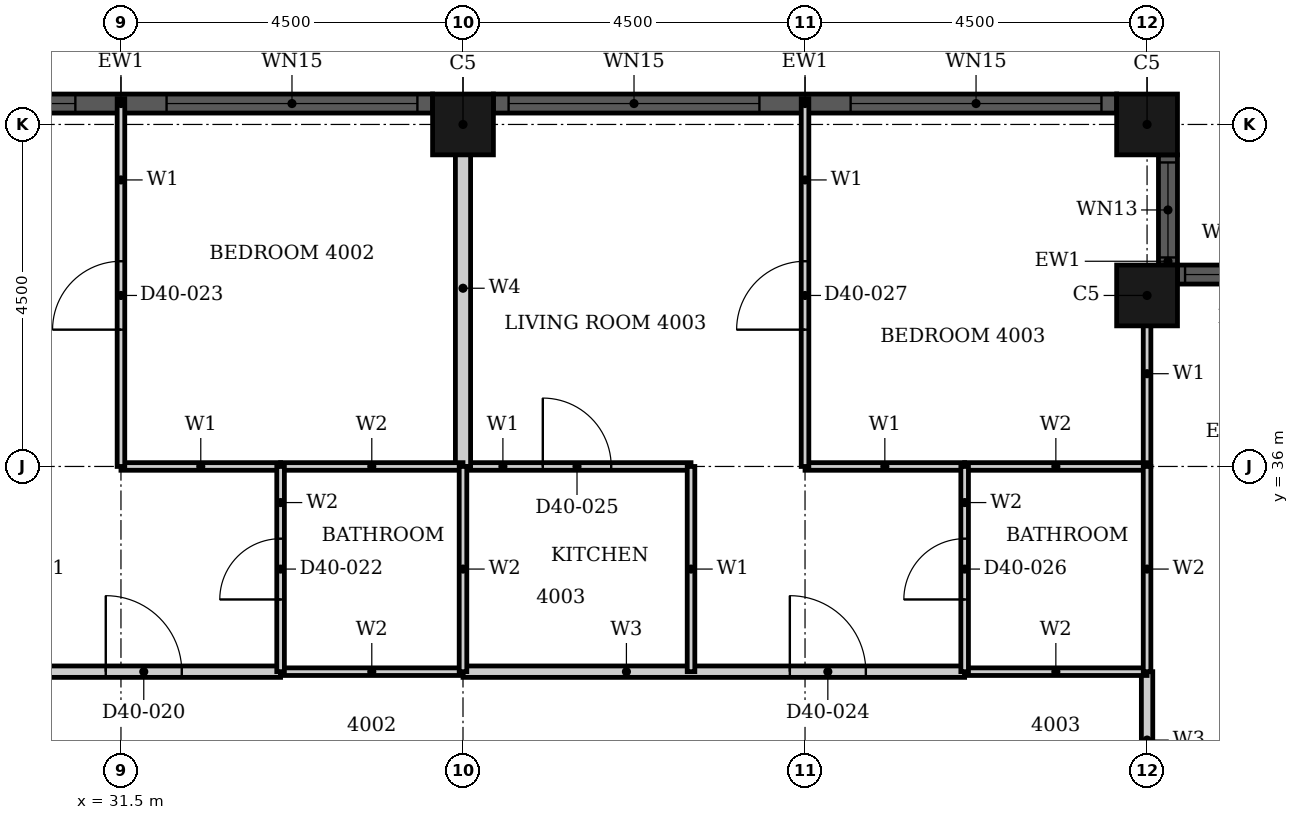
"""IFC4 building model, lengths in metres.
Left out: names, types, materials, properties, quantities, classifications, styles, units other than length and angle.
Written with IfcOpenShell. Run it as: python <this file> out.ifc"""

import sys

from ifc_helpers import new_model, si_unit, direction, frame, frame_2d, origin, origin_2d, place, context, subcontext, project, spatial, rectangle, hollow_rectangle, extrude, element, fill, save


model = new_model("IFC4")
c1 = context("Model", 3, precision=1e-05, world=origin(), true_north=direction((0.0, 1.0)))
c2 = subcontext(c1, "Body", "Model", "MODEL_VIEW")
j1 = project(units=[si_unit("LENGTHUNIT", "METRE"), si_unit("PLANEANGLEUNIT", "RADIAN")], contexts=[c1])
p1 = place(None, origin())
s1 = spatial("IfcSite", under=j1, at=p1, CompositionType="ELEMENT")
p2 = place(p1, origin())
s2 = spatial("IfcBuilding", under=s1, at=p2, CompositionType="ELEMENT")
p3 = place(p2, frame((0.0, 0.0, 161.7)))
s3 = spatial("IfcBuildingStorey", under=s2, at=p3, CompositionType="ELEMENT", Elevation=161.7)
for number, where, z_axis, x_axis in (
    (1, (45.0, 38.25, 0.0), (0.0, 0.0, 1.0), (1.0, 0.0, 0.0)),
    (2, (45.0, 40.5, 0.0), (0.0, 0.0, 1.0), (1.0, 0.0, 0.0)),
    (3, (36.0, 40.5, 0.0), (0.0, 0.0, 1.0), (1.0, 0.0, 0.0)),
):
    element("IfcColumn", number, at=place(p3, frame(where, z_axis=z_axis, x_axis=x_axis)), inside=s3, PredefinedType="COLUMN", context=c2, shape_type="SweptSolid", body=[
        extrude(hollow_rectangle(XDim=0.8, YDim=0.8, WallThickness=0.025, at=origin_2d()), origin(), (0.0, 0.0, 1.0), 3.7),
    ])
p4 = place(p3, frame((46.85, 38.525, 0.0), z_axis=(0.0, 0.0, 1.0), x_axis=(-1.0, 0.0, 0.0)))
e4 = element("IfcWall", 4, at=p4, inside=s3, PredefinedType="SOLIDWALL", context=c2, shape_type="SweptSolid", body=[
    extrude(rectangle(XDim=1.45, YDim=0.25, at=frame_2d((0.725, 0.0))), origin(), (0.0, 0.0, 1.0), 3.7),
])
p5 = place(p4, frame((0.1, 0.0, 0.9)))
e5 = element("IfcOpeningElement", 5, at=p5, cuts=e4, PredefinedType="OPENING", context=c2, shape_type="SweptSolid", body=[
    extrude(rectangle(XDim=1.25, YDim=1.85, at=frame_2d((0.625, 0.925))), frame((0.0, 0.135, 0.0), z_axis=(0.0, -1.0, 0.0), x_axis=(1.0, 0.0, 0.0)), (0.0, 0.0, 1.0), 0.27),
])
p6 = place(p3, frame((45.275, 38.65, 0.0), z_axis=(0.0, 0.0, 1.0), x_axis=(0.0, 1.0, 0.0)))
e6 = element("IfcWall", 6, at=p6, inside=s3, PredefinedType="SOLIDWALL", context=c2, shape_type="SweptSolid", body=[
    extrude(rectangle(XDim=1.45, YDim=0.25, at=frame_2d((0.725, 0.0))), origin(), (0.0, 0.0, 1.0), 3.7),
])
p7 = place(p6, frame((0.1, 0.0, 0.9)))
e7 = element("IfcOpeningElement", 7, at=p7, cuts=e6, PredefinedType="OPENING", context=c2, shape_type="SweptSolid", body=[
    extrude(rectangle(XDim=1.25, YDim=1.85, at=frame_2d((0.625, 0.925))), frame((0.0, 0.135, 0.0), z_axis=(0.0, -1.0, 0.0), x_axis=(1.0, 0.0, 0.0)), (0.0, 0.0, 1.0), 0.27),
])
p8 = place(p3, frame((44.6, 40.775, 0.0), z_axis=(0.0, 0.0, 1.0), x_axis=(-1.0, 0.0, 0.0)))
e8 = element("IfcWall", 8, at=p8, inside=s3, PredefinedType="SOLIDWALL", context=c2, shape_type="SweptSolid", body=[
    extrude(rectangle(XDim=8.2, YDim=0.25, at=frame_2d((4.1, 0.0))), origin(), (0.0, 0.0, 1.0), 3.7),
])
p9 = place(p8, frame((0.2, 0.0, 0.45)))
e9 = element("IfcOpeningElement", 9, at=p9, cuts=e8, PredefinedType="OPENING", context=c2, shape_type="SweptSolid", body=[
    extrude(rectangle(XDim=3.3, YDim=2.3, at=frame_2d((1.65, 1.15))), frame((0.0, 0.135, 0.0), z_axis=(0.0, -1.0, 0.0), x_axis=(1.0, 0.0, 0.0)), (0.0, 0.0, 1.0), 0.27),
])
p10 = place(p8, frame((4.7, 0.0, 0.45)))
e10 = element("IfcOpeningElement", 10, at=p10, cuts=e8, PredefinedType="OPENING", context=c2, shape_type="SweptSolid", body=[
    extrude(rectangle(XDim=3.3, YDim=2.3, at=frame_2d((1.65, 1.15))), frame((0.0, 0.135, 0.0), z_axis=(0.0, -1.0, 0.0), x_axis=(1.0, 0.0, 0.0)), (0.0, 0.0, 1.0), 0.27),
])
p11 = place(p3, frame((35.6, 40.775, 0.0), z_axis=(0.0, 0.0, 1.0), x_axis=(-1.0, 0.0, 0.0)))
e11 = element("IfcWall", 11, at=p11, inside=s3, PredefinedType="SOLIDWALL", context=c2, shape_type="SweptSolid", body=[
    extrude(rectangle(XDim=8.2, YDim=0.25, at=frame_2d((4.1, 0.0))), origin(), (0.0, 0.0, 1.0), 3.7),
])
p12 = place(p11, frame((0.2, 0.0, 0.45)))
e12 = element("IfcOpeningElement", 12, at=p12, cuts=e11, PredefinedType="OPENING", context=c2, shape_type="SweptSolid", body=[
    extrude(rectangle(XDim=3.3, YDim=2.3, at=frame_2d((1.65, 1.15))), frame((0.0, 0.135, 0.0), z_axis=(0.0, -1.0, 0.0), x_axis=(1.0, 0.0, 0.0)), (0.0, 0.0, 1.0), 0.27),
])
p13 = place(p11, frame((4.7, 0.0, 0.45)))
e13 = element("IfcOpeningElement", 13, at=p13, cuts=e11, PredefinedType="OPENING", context=c2, shape_type="SweptSolid", body=[
    extrude(rectangle(XDim=3.3, YDim=2.3, at=frame_2d((1.65, 1.15))), frame((0.0, 0.135, 0.0), z_axis=(0.0, -1.0, 0.0), x_axis=(1.0, 0.0, 0.0)), (0.0, 0.0, 1.0), 0.27),
])
p14 = place(p3, frame((27.0, 33.3, 0.0), z_axis=(0.0, 0.0, 1.0), x_axis=(1.0, 0.0, 0.0)))
e14 = element("IfcWall", 14, at=p14, inside=s3, PredefinedType="PARTITIONING", context=c2, shape_type="SweptSolid", body=[
    extrude(rectangle(XDim=6.6, YDim=0.15, at=frame_2d((3.3, 0.0))), origin(), (0.0, 0.0, 1.0), 3.4),
])
p15 = place(p14, frame((4.3, 0.0, 0.0)))
e15 = element("IfcOpeningElement", 15, at=p15, cuts=e14, PredefinedType="OPENING", context=c2, shape_type="SweptSolid", body=[
    extrude(rectangle(XDim=1.0, YDim=2.2, at=frame_2d((0.5, 1.1))), frame((0.0, 0.085, 0.0), z_axis=(0.0, -1.0, 0.0), x_axis=(1.0, 0.0, 0.0)), (0.0, 0.0, 1.0), 0.17),
])
p16 = place(p3, frame((36.0, 33.3, 0.0), z_axis=(0.0, 0.0, 1.0), x_axis=(1.0, 0.0, 0.0)))
e16 = element("IfcWall", 16, at=p16, inside=s3, PredefinedType="PARTITIONING", context=c2, shape_type="SweptSolid", body=[
    extrude(rectangle(XDim=6.6, YDim=0.15, at=frame_2d((3.3, 0.0))), origin(), (0.0, 0.0, 1.0), 3.4),
])
p17 = place(p16, frame((4.3, 0.0, 0.0)))
e17 = element("IfcOpeningElement", 17, at=p17, cuts=e16, PredefinedType="OPENING", context=c2, shape_type="SweptSolid", body=[
    extrude(rectangle(XDim=1.0, YDim=2.2, at=frame_2d((0.5, 1.1))), frame((0.0, 0.085, 0.0), z_axis=(0.0, -1.0, 0.0), x_axis=(1.0, 0.0, 0.0)), (0.0, 0.0, 1.0), 0.17),
])
p18 = place(p3, frame((45.0, 31.5, 0.0), z_axis=(0.0, 0.0, 1.0), x_axis=(0.0, 1.0, 0.0)))
e18 = element("IfcWall", 18, at=p18, inside=s3, PredefinedType="PARTITIONING", context=c2, shape_type="SweptSolid", body=[
    extrude(rectangle(XDim=1.8, YDim=0.15, at=frame_2d((0.9, 0.0))), origin(), (0.0, 0.0, 1.0), 3.4),
])
for number, where, z_axis, x_axis in (
    (19, (31.5, 36.0, 0.0), (0.0, 0.0, 1.0), (1.0, 0.0, 0.0)),
    (20, (40.5, 36.0, 0.0), (0.0, 0.0, 1.0), (1.0, 0.0, 0.0)),
):
    element("IfcWall", number, at=place(p3, frame(where, z_axis=z_axis, x_axis=x_axis)), inside=s3, PredefinedType="PARTITIONING", context=c2, shape_type="SweptSolid", body=[
        extrude(rectangle(XDim=2.1, YDim=0.1, at=frame_2d((1.05, 0.0))), origin(), (0.0, 0.0, 1.0), 3.4),
    ])
p19 = place(p3, frame((36.0, 36.0, 0.0), z_axis=(0.0, 0.0, 1.0), x_axis=(1.0, 0.0, 0.0)))
e21 = element("IfcWall", 21, at=p19, inside=s3, PredefinedType="PARTITIONING", context=c2, shape_type="SweptSolid", body=[
    extrude(rectangle(XDim=3.0, YDim=0.1, at=frame_2d((1.5, 0.0))), origin(), (0.0, 0.0, 1.0), 3.4),
])
p20 = place(p19, frame((1.05, 0.0, 0.0)))
e22 = element("IfcOpeningElement", 22, at=p20, cuts=e21, PredefinedType="OPENING", context=c2, shape_type="SweptSolid", body=[
    extrude(rectangle(XDim=0.9, YDim=2.1, at=frame_2d((0.45, 1.05))), frame((0.0, 0.06, 0.0), z_axis=(0.0, -1.0, 0.0), x_axis=(1.0, 0.0, 0.0)), (0.0, 0.0, 1.0), 0.12),
])
p21 = place(p3, frame((31.5, 36.0, 0.0), z_axis=(0.0, 0.0, 1.0), x_axis=(0.0, 1.0, 0.0)))
e23 = element("IfcWall", 23, at=p21, inside=s3, PredefinedType="PARTITIONING", context=c2, shape_type="SweptSolid", body=[
    extrude(rectangle(XDim=4.84, YDim=0.1, at=frame_2d((2.42, 0.0))), origin(), (0.0, 0.0, 1.0), 3.4),
])
p22 = place(p21, frame((1.8, 0.0, 0.0)))
e24 = element("IfcOpeningElement", 24, at=p22, cuts=e23, PredefinedType="OPENING", context=c2, shape_type="SweptSolid", body=[
    extrude(rectangle(XDim=0.9, YDim=2.1, at=frame_2d((0.45, 1.05))), frame((0.0, 0.06, 0.0), z_axis=(0.0, -1.0, 0.0), x_axis=(1.0, 0.0, 0.0)), (0.0, 0.0, 1.0), 0.12),
])
p23 = place(p3, frame((39.0, 33.3, 0.0), z_axis=(0.0, 0.0, 1.0), x_axis=(0.0, 1.0, 0.0)))
e25 = element("IfcWall", 25, at=p23, inside=s3, PredefinedType="PARTITIONING", context=c2, shape_type="SweptSolid", body=[
    extrude(rectangle(XDim=2.7, YDim=0.1, at=frame_2d((1.35, 0.0))), origin(), (0.0, 0.0, 1.0), 3.4),
])
p24 = place(p3, frame((40.5, 36.0, 0.0), z_axis=(0.0, 0.0, 1.0), x_axis=(0.0, 1.0, 0.0)))
e26 = element("IfcWall", 26, at=p24, inside=s3, PredefinedType="PARTITIONING", context=c2, shape_type="SweptSolid", body=[
    extrude(rectangle(XDim=4.84, YDim=0.1, at=frame_2d((2.42, 0.0))), origin(), (0.0, 0.0, 1.0), 3.4),
])
p25 = place(p24, frame((1.8, 0.0, 0.0)))
e27 = element("IfcOpeningElement", 27, at=p25, cuts=e26, PredefinedType="OPENING", context=c2, shape_type="SweptSolid", body=[
    extrude(rectangle(XDim=0.9, YDim=2.1, at=frame_2d((0.45, 1.05))), frame((0.0, 0.06, 0.0), z_axis=(0.0, -1.0, 0.0), x_axis=(1.0, 0.0, 0.0)), (0.0, 0.0, 1.0), 0.12),
])
p26 = place(p3, frame((45.0, 36.001, 0.0), z_axis=(0.0, 0.0, 1.0), x_axis=(0.0, 1.0, 0.0)))
e28 = element("IfcWall", 28, at=p26, inside=s3, PredefinedType="PARTITIONING", context=c2, shape_type="SweptSolid", body=[
    extrude(rectangle(XDim=2.439, YDim=0.1, at=frame_2d((1.219, 0.0))), origin(), (0.0, 0.0, 1.0), 3.4),
])
p27 = place(p3, frame((36.0, 36.0, 0.0), z_axis=(0.0, 0.0, 1.0), x_axis=(0.0, 1.0, 0.0)))
e29 = element("IfcWall", 29, at=p27, inside=s3, PredefinedType="PARTITIONING", context=c2, shape_type="SweptSolid", body=[
    extrude(rectangle(XDim=4.69, YDim=0.2, at=frame_2d((2.345, 0.0))), origin(), (0.0, 0.0, 1.0), 3.4),
])
for number, where, z_axis, x_axis in (
    (30, (33.6, 33.3, 0.0), (0.0, 0.0, 1.0), (1.0, 0.0, 0.0)),
    (31, (42.6, 33.3, 0.0), (0.0, 0.0, 1.0), (1.0, 0.0, 0.0)),
    (32, (33.6, 36.0, 0.0), (0.0, 0.0, 1.0), (1.0, 0.0, 0.0)),
    (33, (42.6, 36.0, 0.0), (0.0, 0.0, 1.0), (1.0, 0.0, 0.0)),
):
    element("IfcWall", number, at=place(p3, frame(where, z_axis=z_axis, x_axis=x_axis)), inside=s3, PredefinedType="PARTITIONING", context=c2, shape_type="SweptSolid", body=[
        extrude(rectangle(XDim=2.4, YDim=0.1, at=frame_2d((1.2, 0.0))), origin(), (0.0, 0.0, 1.0), 3.4),
    ])
p28 = place(p3, frame((33.6, 33.3, 0.0), z_axis=(0.0, 0.0, 1.0), x_axis=(0.0, 1.0, 0.0)))
e34 = element("IfcWall", 34, at=p28, inside=s3, PredefinedType="PARTITIONING", context=c2, shape_type="SweptSolid", body=[
    extrude(rectangle(XDim=2.7, YDim=0.1, at=frame_2d((1.35, 0.0))), origin(), (0.0, 0.0, 1.0), 3.4),
])
p29 = place(p28, frame((0.95, 0.0, 0.0)))
e35 = element("IfcOpeningElement", 35, at=p29, cuts=e34, PredefinedType="OPENING", context=c2, shape_type="SweptSolid", body=[
    extrude(rectangle(XDim=0.8, YDim=2.1, at=frame_2d((0.4, 1.05))), frame((0.0, 0.06, 0.0), z_axis=(0.0, -1.0, 0.0), x_axis=(1.0, 0.0, 0.0)), (0.0, 0.0, 1.0), 0.12),
])
p30 = place(p3, frame((36.0, 33.3, 0.0), z_axis=(0.0, 0.0, 1.0), x_axis=(0.0, 1.0, 0.0)))
e36 = element("IfcWall", 36, at=p30, inside=s3, PredefinedType="PARTITIONING", context=c2, shape_type="SweptSolid", body=[
    extrude(rectangle(XDim=2.7, YDim=0.1, at=frame_2d((1.35, 0.0))), origin(), (0.0, 0.0, 1.0), 3.4),
])
p31 = place(p3, frame((42.6, 33.3, 0.0), z_axis=(0.0, 0.0, 1.0), x_axis=(0.0, 1.0, 0.0)))
e37 = element("IfcWall", 37, at=p31, inside=s3, PredefinedType="PARTITIONING", context=c2, shape_type="SweptSolid", body=[
    extrude(rectangle(XDim=2.7, YDim=0.1, at=frame_2d((1.35, 0.0))), origin(), (0.0, 0.0, 1.0), 3.4),
])
p32 = place(p31, frame((0.95, 0.0, 0.0)))
e38 = element("IfcOpeningElement", 38, at=p32, cuts=e37, PredefinedType="OPENING", context=c2, shape_type="SweptSolid", body=[
    extrude(rectangle(XDim=0.8, YDim=2.1, at=frame_2d((0.4, 1.05))), frame((0.0, 0.06, 0.0), z_axis=(0.0, -1.0, 0.0), x_axis=(1.0, 0.0, 0.0)), (0.0, 0.0, 1.0), 0.12),
])
p33 = place(p3, frame((45.0, 33.3, 0.0), z_axis=(0.0, 0.0, 1.0), x_axis=(0.0, 1.0, 0.0)))
e39 = element("IfcWall", 39, at=p33, inside=s3, PredefinedType="PARTITIONING", context=c2, shape_type="SweptSolid", body=[
    extrude(rectangle(XDim=2.7, YDim=0.1, at=frame_2d((1.35, 0.0))), origin(), (0.0, 0.0, 1.0), 3.4),
])
p34 = place(p5, origin())
e40 = element("IfcWindow", 40, at=p34, inside=s3, PartitioningType="SINGLE_PANEL", PredefinedType="WINDOW", context=c2, shape_type="SweptSolid", body=[
    extrude(rectangle(XDim=1.25, YDim=1.85, at=frame_2d((0.625, 0.925))), frame((0.0, 0.03, 0.0), z_axis=(0.0, -1.0, 0.0), x_axis=(1.0, 0.0, 0.0)), (0.0, 0.0, 1.0), 0.06),
])
fill(e5, e40)
p35 = place(p7, origin())
e41 = element("IfcWindow", 41, at=p35, inside=s3, PartitioningType="SINGLE_PANEL", PredefinedType="WINDOW", context=c2, shape_type="SweptSolid", body=[
    extrude(rectangle(XDim=1.25, YDim=1.85, at=frame_2d((0.625, 0.925))), frame((0.0, 0.03, 0.0), z_axis=(0.0, -1.0, 0.0), x_axis=(1.0, 0.0, 0.0)), (0.0, 0.0, 1.0), 0.06),
])
fill(e7, e41)
p36 = place(p9, origin())
e42 = element("IfcWindow", 42, at=p36, inside=s3, PartitioningType="SINGLE_PANEL", PredefinedType="WINDOW", context=c2, shape_type="SweptSolid", body=[
    extrude(rectangle(XDim=3.3, YDim=2.3, at=frame_2d((1.65, 1.15))), frame((0.0, 0.03, 0.0), z_axis=(0.0, -1.0, 0.0), x_axis=(1.0, 0.0, 0.0)), (0.0, 0.0, 1.0), 0.06),
])
fill(e9, e42)
p37 = place(p10, origin())
e43 = element("IfcWindow", 43, at=p37, inside=s3, PartitioningType="SINGLE_PANEL", PredefinedType="WINDOW", context=c2, shape_type="SweptSolid", body=[
    extrude(rectangle(XDim=3.3, YDim=2.3, at=frame_2d((1.65, 1.15))), frame((0.0, 0.03, 0.0), z_axis=(0.0, -1.0, 0.0), x_axis=(1.0, 0.0, 0.0)), (0.0, 0.0, 1.0), 0.06),
])
fill(e10, e43)
p38 = place(p12, origin())
e44 = element("IfcWindow", 44, at=p38, inside=s3, PartitioningType="SINGLE_PANEL", PredefinedType="WINDOW", context=c2, shape_type="SweptSolid", body=[
    extrude(rectangle(XDim=3.3, YDim=2.3, at=frame_2d((1.65, 1.15))), frame((0.0, 0.03, 0.0), z_axis=(0.0, -1.0, 0.0), x_axis=(1.0, 0.0, 0.0)), (0.0, 0.0, 1.0), 0.06),
])
fill(e12, e44)
p39 = place(p13, origin())
e45 = element("IfcWindow", 45, at=p39, inside=s3, PartitioningType="SINGLE_PANEL", PredefinedType="WINDOW", context=c2, shape_type="SweptSolid", body=[
    extrude(rectangle(XDim=3.3, YDim=2.3, at=frame_2d((1.65, 1.15))), frame((0.0, 0.03, 0.0), z_axis=(0.0, -1.0, 0.0), x_axis=(1.0, 0.0, 0.0)), (0.0, 0.0, 1.0), 0.06),
])
fill(e13, e45)
p40 = place(p15, origin())
e46 = element("IfcDoor", 46, at=p40, inside=s3, OperationType="SINGLE_SWING_LEFT", PredefinedType="DOOR", context=c2, shape_type="SweptSolid", body=[
    extrude(rectangle(XDim=1.0, YDim=2.2, at=frame_2d((0.5, 1.1))), frame((0.0, 0.025, 0.0), z_axis=(0.0, -1.0, 0.0), x_axis=(1.0, 0.0, 0.0)), (0.0, 0.0, 1.0), 0.05),
])
fill(e15, e46)
p41 = place(p29, origin())
e47 = element("IfcDoor", 47, at=p41, inside=s3, OperationType="SINGLE_SWING_LEFT", PredefinedType="DOOR", context=c2, shape_type="SweptSolid", body=[
    extrude(rectangle(XDim=0.8, YDim=2.1, at=frame_2d((0.4, 1.05))), frame((0.0, 0.025, 0.0), z_axis=(0.0, -1.0, 0.0), x_axis=(1.0, 0.0, 0.0)), (0.0, 0.0, 1.0), 0.05),
])
fill(e35, e47)
p42 = place(p22, origin())
e48 = element("IfcDoor", 48, at=p42, inside=s3, OperationType="SINGLE_SWING_LEFT", PredefinedType="DOOR", context=c2, shape_type="SweptSolid", body=[
    extrude(rectangle(XDim=0.9, YDim=2.1, at=frame_2d((0.45, 1.05))), frame((0.0, 0.025, 0.0), z_axis=(0.0, -1.0, 0.0), x_axis=(1.0, 0.0, 0.0)), (0.0, 0.0, 1.0), 0.05),
])
fill(e24, e48)
p43 = place(p17, origin())
e49 = element("IfcDoor", 49, at=p43, inside=s3, OperationType="SINGLE_SWING_RIGHT", PredefinedType="DOOR", context=c2, shape_type="SweptSolid", body=[
    extrude(rectangle(XDim=1.0, YDim=2.2, at=frame_2d((0.5, 1.1))), frame((0.0, 0.025, 0.0), z_axis=(0.0, -1.0, 0.0), x_axis=(1.0, 0.0, 0.0)), (0.0, 0.0, 1.0), 0.05),
])
fill(e17, e49)
p44 = place(p20, origin())
e50 = element("IfcDoor", 50, at=p44, inside=s3, OperationType="SINGLE_SWING_LEFT", PredefinedType="DOOR", context=c2, shape_type="SweptSolid", body=[
    extrude(rectangle(XDim=0.9, YDim=2.1, at=frame_2d((0.45, 1.05))), frame((0.0, 0.025, 0.0), z_axis=(0.0, -1.0, 0.0), x_axis=(1.0, 0.0, 0.0)), (0.0, 0.0, 1.0), 0.05),
])
fill(e22, e50)
p45 = place(p32, origin())
e51 = element("IfcDoor", 51, at=p45, inside=s3, OperationType="SINGLE_SWING_LEFT", PredefinedType="DOOR", context=c2, shape_type="SweptSolid", body=[
    extrude(rectangle(XDim=0.8, YDim=2.1, at=frame_2d((0.4, 1.05))), frame((0.0, 0.025, 0.0), z_axis=(0.0, -1.0, 0.0), x_axis=(1.0, 0.0, 0.0)), (0.0, 0.0, 1.0), 0.05),
])
fill(e38, e51)
p46 = place(p25, origin())
e52 = element("IfcDoor", 52, at=p46, inside=s3, OperationType="SINGLE_SWING_RIGHT", PredefinedType="DOOR", context=c2, shape_type="SweptSolid", body=[
    extrude(rectangle(XDim=0.9, YDim=2.1, at=frame_2d((0.45, 1.05))), frame((0.0, 0.025, 0.0), z_axis=(0.0, -1.0, 0.0), x_axis=(1.0, 0.0, 0.0)), (0.0, 0.0, 1.0), 0.05),
])
fill(e27, e52)
save(model, sys.argv[1])
